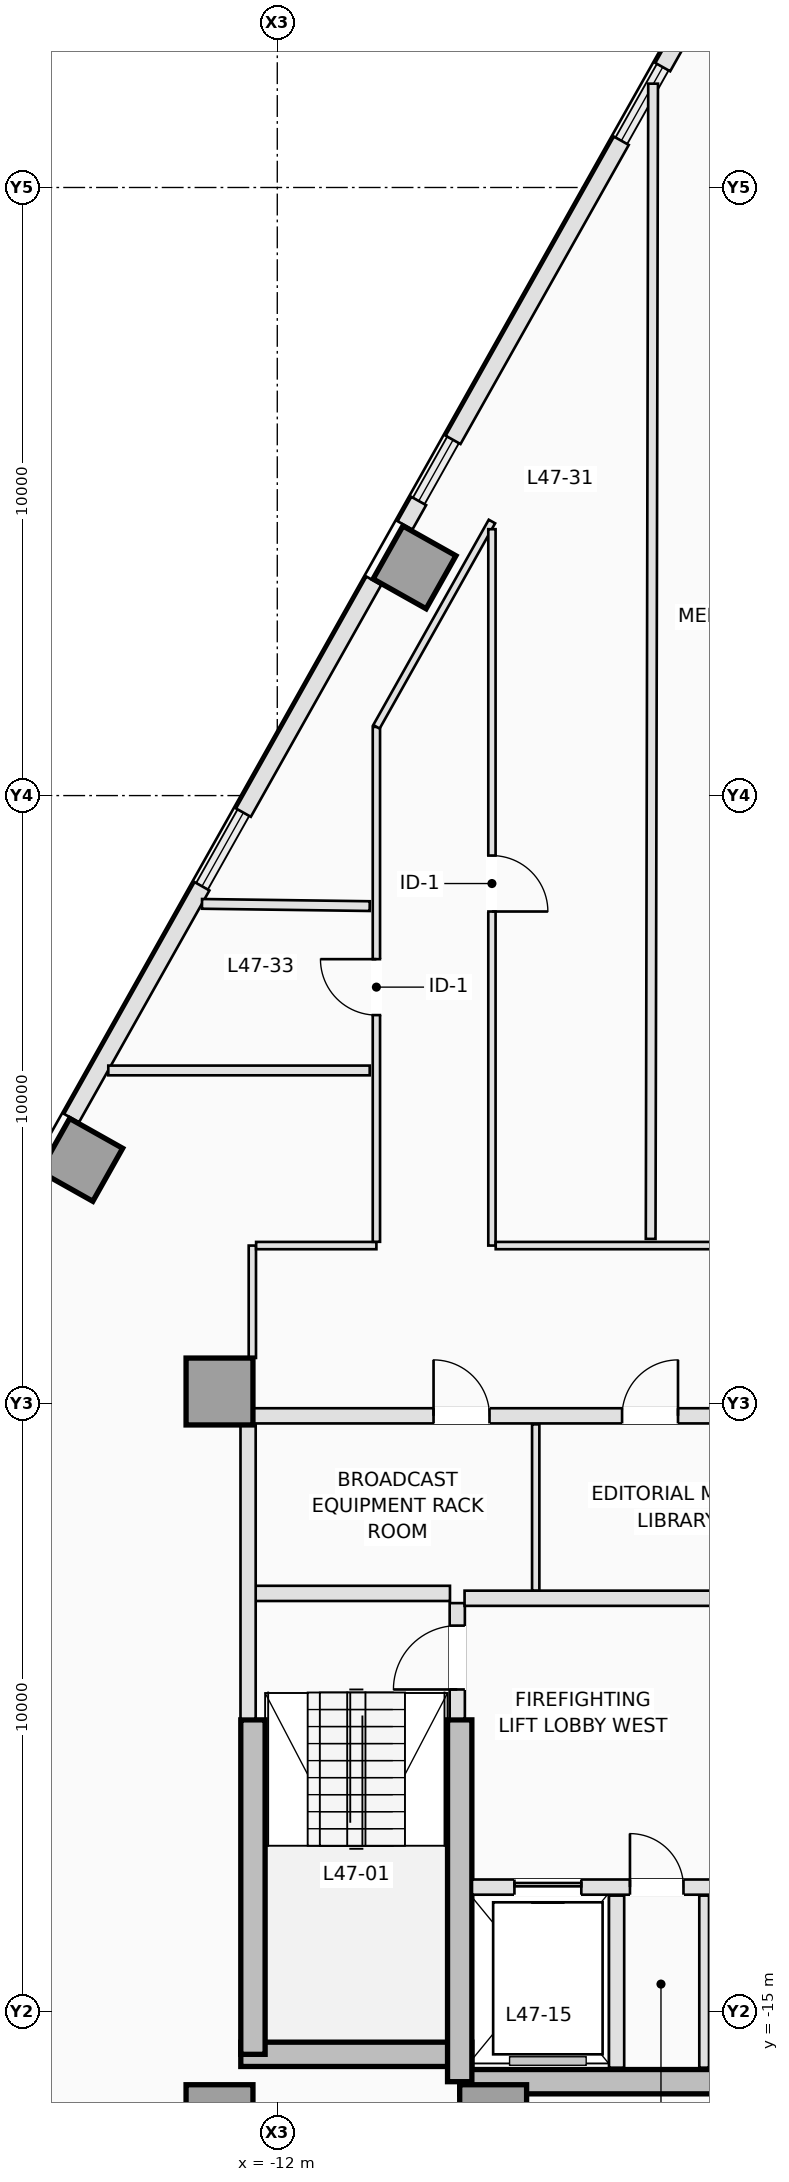
"""IFC4 building model, lengths in metres.
Left out: names, types, materials, properties, quantities, classifications, styles, units other than length and angle.
Written with IfcOpenShell. Run it as: python <this file> out.ifc"""

import sys

from ifc_helpers import new_model, si_unit, direction, frame, frame_2d, origin, origin_2d, place, context, subcontext, project, spatial, rectangle, extrude, element, fill, save


model = new_model("IFC4")
c1 = context("Model", 3, precision=1e-05, world=origin(), true_north=direction((0.0, 1.0)))
c2 = subcontext(c1, "Body", "Model", "MODEL_VIEW")
j1 = project(units=[si_unit("LENGTHUNIT", "METRE"), si_unit("PLANEANGLEUNIT", "RADIAN")], contexts=[c1])
p1 = place(None, origin())
s1 = spatial("IfcSite", under=j1, at=p1, CompositionType="ELEMENT")
p2 = place(p1, origin())
s2 = spatial("IfcBuilding", under=s1, at=p2, CompositionType="ELEMENT")
p3 = place(p2, frame((0.0, 0.0, 172.0)))
s3 = spatial("IfcBuildingStorey", under=s2, at=p3, CompositionType="ELEMENT", Elevation=172.0)
p4 = place(p3, frame((-12.6, -15.7, 0.0), z_axis=(0.0, 0.0, 1.0), x_axis=(1.0, 0.0, 0.0)))
e1 = element("IfcWall", 1, at=p4, inside=s3, PredefinedType="SHEAR", context=c2, shape_type="SweptSolid", body=[
    extrude(rectangle(XDim=3.8, YDim=0.4, at=frame_2d((1.9, 0.0))), origin(), (0.0, 0.0, 1.0), 3.5),
])
p5 = place(p3, frame((-9.0, -16.15, 0.0), z_axis=(0.0, 0.0, 1.0), x_axis=(1.0, 0.0, 0.0)))
e2 = element("IfcWall", 2, at=p5, inside=s3, PredefinedType="SHEAR", context=c2, shape_type="SweptSolid", body=[
    extrude(rectangle(XDim=5.25, YDim=0.4, at=frame_2d((2.625, 0.0))), origin(), (0.0, 0.0, 1.0), 3.5),
])
p6 = place(p3, frame((-12.4, -15.7, 0.0), z_axis=(0.0, 0.0, 1.0), x_axis=(0.0, 1.0, 0.0)))
e3 = element("IfcWall", 3, at=p6, inside=s3, PredefinedType="SHEAR", context=c2, shape_type="SweptSolid", body=[
    extrude(rectangle(XDim=5.5, YDim=0.4, at=frame_2d((2.75, 0.0))), origin(), (0.0, 0.0, 1.0), 3.5),
])
p7 = place(p3, frame((-9.0, -16.15, 0.0), z_axis=(0.0, 0.0, 1.0), x_axis=(0.0, 1.0, 0.0)))
e4 = element("IfcWall", 4, at=p7, inside=s3, PredefinedType="SHEAR", context=c2, shape_type="SweptSolid", body=[
    extrude(rectangle(XDim=5.95, YDim=0.4, at=frame_2d((2.975, 0.0))), origin(), (0.0, 0.0, 1.0), 3.5),
])
for number, where, z_axis, x_axis in (
    (5, (-12.95, -16.75, 0.0), (0.0, 0.0, 1.0), (1.0, 0.0, 0.0)),
    (6, (-8.45, -16.75, 0.0), (0.0, 0.0, 1.0), (1.0, 0.0, 0.0)),
    (7, (-12.95, -4.8, 0.0), (0.0, 0.0, 1.0), (1.0, 0.0, 0.0)),
):
    element("IfcColumn", number, at=place(p3, frame(where, z_axis=z_axis, x_axis=x_axis)), inside=s3, PredefinedType="COLUMN", context=c2, shape_type="SweptSolid", body=[
        extrude(rectangle(XDim=1.1, YDim=1.1, at=origin_2d()), origin(), (0.0, 0.0, 1.0), 3.5),
    ])
for number, where, z_axis, x_axis in (
    (8, (-9.743, 8.753, 0.0), (0.0, 0.0, 1.0), (-0.872, 0.49, 0.0)),
    (9, (-15.224, -0.991, 0.0), (0.0, 0.0, 1.0), (-0.872, 0.49, 0.0)),
):
    element("IfcColumn", number, at=place(p3, frame(where, z_axis=z_axis, x_axis=x_axis)), inside=s3, PredefinedType="COLUMN", context=c2, shape_type="SweptSolid", body=[
        extrude(rectangle(XDim=1.0, YDim=1.0, at=origin_2d()), origin(), (0.0, 0.0, 1.0), 3.5),
    ])
p8 = place(p3, frame((-9.9, 9.444, 0.0), z_axis=(0.0, 0.0, 1.0), x_axis=(0.490412424957, 0.871490478116, 0.0)))
e10 = element("IfcWall", 10, at=p8, inside=s3, PredefinedType="STANDARD", context=c2, shape_type="SweptSolid", body=[
    extrude(rectangle(XDim=0.46, YDim=0.28, at=frame_2d((0.23, 0.0))), origin(), (0.0, 0.0, 1.0), 3.25),
])
p9 = place(p3, frame((-9.109, 10.85, 0.0), z_axis=(0.0, 0.0, 1.0), x_axis=(0.490289995219, 0.871559361483, 0.0)))
e11 = element("IfcWall", 11, at=p9, inside=s3, PredefinedType="STANDARD", context=c2, shape_type="SweptSolid", body=[
    extrude(rectangle(XDim=5.643, YDim=0.28, at=frame_2d((2.822, 0.0))), origin(), (0.0, 0.0, 1.0), 3.25),
])
p10 = place(p3, frame((-5.661, 16.98, 0.0), z_axis=(0.0, 0.0, 1.0), x_axis=(0.490248749158, 0.871582562899, 0.0)))
e12 = element("IfcWall", 12, at=p10, inside=s3, PredefinedType="STANDARD", context=c2, shape_type="SweptSolid", body=[
    extrude(rectangle(XDim=1.856, YDim=0.28, at=frame_2d((0.928, 0.0))), origin(), (0.0, 0.0, 1.0), 3.25),
])
p11 = place(p3, frame((-15.383, -0.305, 0.0), z_axis=(0.0, 0.0, 1.0), x_axis=(0.490232095789, 0.871591929895, 0.0)))
e13 = element("IfcWall", 13, at=p11, inside=s3, PredefinedType="STANDARD", context=c2, shape_type="SweptSolid", body=[
    extrude(rectangle(XDim=4.375, YDim=0.28, at=frame_2d((2.188, 0.0))), origin(), (0.0, 0.0, 1.0), 3.25),
])
p12 = place(p3, frame((-12.557, 4.72, 0.0), z_axis=(0.0, 0.0, 1.0), x_axis=(0.490274486291, 0.871568085747, 0.0)))
e14 = element("IfcWall", 14, at=p12, inside=s3, PredefinedType="STANDARD", context=c2, shape_type="SweptSolid", body=[
    extrude(rectangle(XDim=4.375, YDim=0.28, at=frame_2d((2.188, 0.0))), origin(), (0.0, 0.0, 1.0), 3.25),
])
p13 = place(p3, frame((-9.04, -10.18, 0.0), z_axis=(0.0, 0.0, 1.0), x_axis=(0.0, 1.0, 0.0)))
e15 = element("IfcWall", 15, at=p13, inside=s3, PredefinedType="PARTITIONING", context=c2, shape_type="SweptSolid", body=[
    extrude(rectangle(XDim=1.9, YDim=0.25, at=frame_2d((0.95, 0.0))), origin(), (0.0, 0.0, 1.0), 3.25),
])
p14 = place(p13, frame((0.48, 0.0, 0.0)))
e16 = element("IfcOpeningElement", 16, at=p14, cuts=e15, PredefinedType="OPENING", context=c2, shape_type="SweptSolid", body=[
    extrude(rectangle(XDim=1.05, YDim=2.15, at=frame_2d((0.525, 1.075))), frame((0.0, 0.135, 0.0), z_axis=(0.0, -1.0, 0.0), x_axis=(1.0, 0.0, 0.0)), (0.0, 0.0, 1.0), 0.27),
])
p15 = place(p3, frame((-12.38, -8.12, 0.0), z_axis=(0.0, 0.0, 1.0), x_axis=(1.0, 0.0, 0.0)))
e17 = element("IfcWall", 17, at=p15, inside=s3, PredefinedType="PARTITIONING", context=c2, shape_type="SweptSolid", body=[
    extrude(rectangle(XDim=3.22, YDim=0.25, at=frame_2d((1.61, 0.0))), origin(), (0.0, 0.0, 1.0), 3.25),
])
p16 = place(p3, frame((-12.48, -10.18, 0.0), z_axis=(0.0, 0.0, 1.0), x_axis=(0.0, 1.0, 0.0)))
e18 = element("IfcWall", 18, at=p16, inside=s3, PredefinedType="PARTITIONING", context=c2, shape_type="SweptSolid", body=[
    extrude(rectangle(XDim=4.828, YDim=0.25, at=frame_2d((2.414, 0.0))), origin(), (0.0, 0.0, 1.0), 3.25),
])
p17 = place(p3, frame((-8.798, -12.95, 0.0), z_axis=(0.0, 0.0, 1.0), x_axis=(1.0, 0.0, 0.0)))
e19 = element("IfcWall", 19, at=p17, inside=s3, PredefinedType="PARTITIONING", context=c2, shape_type="SweptSolid", body=[
    extrude(rectangle(XDim=5.118, YDim=0.25, at=frame_2d((2.559, 0.0))), origin(), (0.0, 0.0, 1.0), 3.25),
])
p18 = place(p17, frame((0.698, 0.0, 0.0)))
e20 = element("IfcOpeningElement", 20, at=p18, cuts=e19, PredefinedType="OPENING", context=c2, shape_type="SweptSolid", body=[
    extrude(rectangle(XDim=1.1, YDim=2.15, at=frame_2d((0.55, 1.075))), frame((0.0, 0.135, 0.0), z_axis=(0.0, -1.0, 0.0), x_axis=(1.0, 0.0, 0.0)), (0.0, 0.0, 1.0), 0.27),
])
p19 = place(p17, frame((2.598, 0.0, 0.0)))
e21 = element("IfcOpeningElement", 21, at=p19, cuts=e19, PredefinedType="OPENING", context=c2, shape_type="SweptSolid", body=[
    extrude(rectangle(XDim=0.88, YDim=2.1, at=frame_2d((0.44, 1.05))), frame((0.0, 0.135, 0.0), z_axis=(0.0, -1.0, 0.0), x_axis=(1.0, 0.0, 0.0)), (0.0, 0.0, 1.0), 0.27),
])
p20 = place(p17, frame((3.998, 0.0, 0.0)))
e22 = element("IfcOpeningElement", 22, at=p20, cuts=e19, PredefinedType="OPENING", context=c2, shape_type="SweptSolid", body=[
    extrude(rectangle(XDim=0.88, YDim=2.1, at=frame_2d((0.44, 1.05))), frame((0.0, 0.135, 0.0), z_axis=(0.0, -1.0, 0.0), x_axis=(1.0, 0.0, 0.0)), (0.0, 0.0, 1.0), 0.27),
])
p21 = place(p3, frame((-6.42, -15.92, 0.0), z_axis=(0.0, 0.0, 1.0), x_axis=(0.0, 1.0, 0.0)))
e23 = element("IfcWall", 23, at=p21, inside=s3, PredefinedType="PARTITIONING", context=c2, shape_type="SweptSolid", body=[
    extrude(rectangle(XDim=2.83, YDim=0.25, at=frame_2d((1.415, 0.0))), origin(), (0.0, 0.0, 1.0), 3.25),
])
p22 = place(p3, frame((-4.98, -15.92, 0.0), z_axis=(0.0, 0.0, 1.0), x_axis=(0.0, 1.0, 0.0)))
e24 = element("IfcWall", 24, at=p22, inside=s3, PredefinedType="PARTITIONING", context=c2, shape_type="SweptSolid", body=[
    extrude(rectangle(XDim=2.83, YDim=0.16, at=frame_2d((1.415, 0.0))), origin(), (0.0, 0.0, 1.0), 3.25),
])
p23 = place(p3, frame((-8.92, -8.2, 0.0), z_axis=(0.0, 0.0, 1.0), x_axis=(1.0, 0.0, 0.0)))
e25 = element("IfcWall", 25, at=p23, inside=s3, PredefinedType="PARTITIONING", context=c2, shape_type="SweptSolid", body=[
    extrude(rectangle(XDim=5.24, YDim=0.25, at=frame_2d((2.62, 0.0))), origin(), (0.0, 0.0, 1.0), 3.25),
])
p24 = place(p3, frame((-12.398, -5.2, 0.0), z_axis=(0.0, 0.0, 1.0), x_axis=(1.0, 0.0, 0.0)))
e26 = element("IfcWall", 26, at=p24, inside=s3, PredefinedType="PARTITIONING", context=c2, shape_type="SweptSolid", body=[
    extrude(rectangle(XDim=8.096, YDim=0.25, at=frame_2d((4.048, 0.0))), origin(), (0.0, 0.0, 1.0), 3.25),
])
p25 = place(p24, frame((2.968, 0.0, 0.0)))
e27 = element("IfcOpeningElement", 27, at=p25, cuts=e26, PredefinedType="OPENING", context=c2, shape_type="SweptSolid", body=[
    extrude(rectangle(XDim=0.92, YDim=2.12, at=frame_2d((0.46, 1.06))), frame((0.0, 0.135, 0.0), z_axis=(0.0, -1.0, 0.0), x_axis=(1.0, 0.0, 0.0)), (0.0, 0.0, 1.0), 0.27),
])
p26 = place(p24, frame((6.068, 0.0, 0.0)))
e28 = element("IfcOpeningElement", 28, at=p26, cuts=e26, PredefinedType="OPENING", context=c2, shape_type="SweptSolid", body=[
    extrude(rectangle(XDim=0.92, YDim=2.12, at=frame_2d((0.46, 1.06))), frame((0.0, 0.135, 0.0), z_axis=(0.0, -1.0, 0.0), x_axis=(1.0, 0.0, 0.0)), (0.0, 0.0, 1.0), 0.27),
])
p27 = place(p3, frame((-7.75, -8.073, 0.0), z_axis=(0.0, 0.0, 1.0), x_axis=(0.0, 1.0, 0.0)))
e29 = element("IfcWall", 29, at=p27, inside=s3, PredefinedType="PARTITIONING", context=c2, shape_type="SweptSolid", body=[
    extrude(rectangle(XDim=2.733, YDim=0.12, at=frame_2d((1.366, 0.0))), origin(), (0.0, 0.0, 1.0), 3.25),
])
p28 = place(p3, frame((-12.41, -4.248, 0.0), z_axis=(0.0, 0.0, 1.0), x_axis=(0.0, 1.0, 0.0)))
e30 = element("IfcWall", 30, at=p28, inside=s3, PredefinedType="PARTITIONING", context=c2, shape_type="SweptSolid", body=[
    extrude(rectangle(XDim=1.848, YDim=0.12, at=frame_2d((0.924, 0.0))), origin(), (0.0, 0.0, 1.0), 3.25),
])
p29 = place(p3, frame((-12.348, -2.4, 0.0), z_axis=(0.0, 0.0, 1.0), x_axis=(1.0, 0.0, 0.0)))
e31 = element("IfcWall", 31, at=p29, inside=s3, PredefinedType="PARTITIONING", context=c2, shape_type="SweptSolid", body=[
    extrude(rectangle(XDim=1.978, YDim=0.12, at=frame_2d((0.989, 0.0))), origin(), (0.0, 0.0, 1.0), 3.25),
])
p30 = place(p3, frame((-10.37, -2.338, 0.0), z_axis=(0.0, 0.0, 1.0), x_axis=(0.0, 1.0, 0.0)))
e32 = element("IfcWall", 32, at=p30, inside=s3, PredefinedType="PARTITIONING", context=c2, shape_type="SweptSolid", body=[
    extrude(rectangle(XDim=8.467, YDim=0.12, at=frame_2d((4.233, 0.0))), origin(), (0.0, 0.0, 1.0), 3.25),
])
p31 = place(p30, frame((3.728, 0.0, 0.0)))
e33 = element("IfcOpeningElement", 33, at=p31, cuts=e32, PredefinedType="OPENING", context=c2, shape_type="SweptSolid", body=[
    extrude(rectangle(XDim=0.92, YDim=2.12, at=frame_2d((0.46, 1.06))), frame((0.0, 0.07, 0.0), z_axis=(0.0, -1.0, 0.0), x_axis=(1.0, 0.0, 0.0)), (0.0, 0.0, 1.0), 0.14),
])
p32 = place(p3, frame((-10.369, 6.131, 0.0), z_axis=(0.0, 0.0, 1.0), x_axis=(0.49024926945, 0.871582270244, 0.0)))
e34 = element("IfcWall", 34, at=p32, inside=s3, PredefinedType="PARTITIONING", context=c2, shape_type="SweptSolid", body=[
    extrude(rectangle(XDim=3.873, YDim=0.12, at=frame_2d((1.937, 0.0))), origin(), (0.0, 0.0, 1.0), 3.25),
])
p33 = place(p3, frame((-8.47, 9.381, 0.0), z_axis=(0.0, 0.0, 1.0), x_axis=(0.0, -1.0, 0.0)))
e35 = element("IfcWall", 35, at=p33, inside=s3, PredefinedType="PARTITIONING", context=c2, shape_type="SweptSolid", body=[
    extrude(rectangle(XDim=11.781, YDim=0.12, at=frame_2d((5.89, 0.0))), origin(), (0.0, 0.0, 1.0), 3.25),
])
p34 = place(p33, frame((5.367, 0.0, 0.0)))
e36 = element("IfcOpeningElement", 36, at=p34, cuts=e35, PredefinedType="OPENING", context=c2, shape_type="SweptSolid", body=[
    extrude(rectangle(XDim=0.92, YDim=2.12, at=frame_2d((0.46, 1.06))), frame((0.0, 0.07, 0.0), z_axis=(0.0, -1.0, 0.0), x_axis=(1.0, 0.0, 0.0)), (0.0, 0.0, 1.0), 0.14),
])
p35 = place(p3, frame((-8.408, -2.4, 0.0), z_axis=(0.0, 0.0, 1.0), x_axis=(1.0, 0.0, 0.0)))
e37 = element("IfcWall", 37, at=p35, inside=s3, PredefinedType="PARTITIONING", context=c2, shape_type="SweptSolid", body=[
    extrude(rectangle(XDim=9.646, YDim=0.12, at=frame_2d((4.823, 0.0))), origin(), (0.0, 0.0, 1.0), 2.891),
])
p36 = place(p35, frame((7.341, 0.0, 0.0)))
e38 = element("IfcOpeningElement", 38, at=p36, cuts=e37, PredefinedType="OPENING", context=c2, shape_type="SweptSolid", body=[
    extrude(rectangle(XDim=0.92, YDim=2.12, at=frame_2d((0.46, 1.06))), frame((0.0, 0.07, 0.0), z_axis=(0.0, -1.0, 0.0), x_axis=(1.0, 0.0, 0.0)), (0.0, 0.0, 1.0), 0.14),
])
p37 = place(p35, frame((3.801, 0.0, 0.0)))
e39 = element("IfcOpeningElement", 39, at=p37, cuts=e37, PredefinedType="OPENING", context=c2, shape_type="SweptSolid", body=[
    extrude(rectangle(XDim=0.92, YDim=2.12, at=frame_2d((0.46, 1.06))), frame((0.0, 0.07, 0.0), z_axis=(0.0, -1.0, 0.0), x_axis=(1.0, 0.0, 0.0)), (0.0, 0.0, 1.0), 0.14),
])
p38 = place(p3, frame((-5.86, -2.29, 0.0), z_axis=(0.0, 0.0, 1.0), x_axis=(0.002107612298, 0.999997778983, 0.0)))
e40 = element("IfcWall", 40, at=p38, inside=s3, PredefinedType="PARTITIONING", context=c2, shape_type="SweptSolid", body=[
    extrude(rectangle(XDim=18.997, YDim=0.16, at=frame_2d((9.499, 0.0))), origin(), (0.0, 0.0, 1.0), 3.25),
])
p39 = place(p3, frame((-10.48, 3.182, 0.0), z_axis=(0.0, 0.0, 1.0), x_axis=(-0.999909495127, 0.013453681797, 0.0)))
e41 = element("IfcWall", 41, at=p39, inside=s3, PredefinedType="PARTITIONING", context=c2, shape_type="SweptSolid", body=[
    extrude(rectangle(XDim=2.758, YDim=0.16, at=frame_2d((1.379, 0.0))), origin(), (0.0, 0.0, 1.0), 3.25),
])
p40 = place(p3, frame((-10.48, 0.48, 0.0), z_axis=(0.0, 0.0, 1.0), x_axis=(-1.0, 0.0, 0.0)))
e42 = element("IfcWall", 42, at=p40, inside=s3, PredefinedType="PARTITIONING", context=c2, shape_type="SweptSolid", body=[
    extrude(rectangle(XDim=4.299, YDim=0.16, at=frame_2d((2.149, 0.0))), origin(), (0.0, 0.0, 1.0), 3.25),
])
p41 = place(p18, origin())
e43 = element("IfcDoor", 43, at=p41, inside=s3, OperationType="SLIDING_TO_LEFT", PredefinedType="DOOR", context=c2, shape_type="SweptSolid", body=[
    extrude(rectangle(XDim=1.1, YDim=2.15, at=frame_2d((0.55, 1.075))), frame((0.0, 0.025, 0.0), z_axis=(0.0, -1.0, 0.0), x_axis=(1.0, 0.0, 0.0)), (0.0, 0.0, 1.0), 0.05),
])
fill(e20, e43)
p42 = place(p14, origin())
e44 = element("IfcDoor", 44, at=p42, inside=s3, OperationType="SINGLE_SWING_LEFT", PredefinedType="DOOR", context=c2, shape_type="SweptSolid", body=[
    extrude(rectangle(XDim=1.05, YDim=2.15, at=frame_2d((0.525, 1.075))), frame((0.0, 0.025, 0.0), z_axis=(0.0, -1.0, 0.0), x_axis=(1.0, 0.0, 0.0)), (0.0, 0.0, 1.0), 0.05),
])
fill(e16, e44)
p43 = place(p19, origin())
e45 = element("IfcDoor", 45, at=p43, inside=s3, OperationType="SINGLE_SWING_LEFT", PredefinedType="TRAPDOOR", context=c2, shape_type="SweptSolid", body=[
    extrude(rectangle(XDim=0.88, YDim=2.1, at=frame_2d((0.44, 1.05))), frame((0.0, 0.025, 0.0), z_axis=(0.0, -1.0, 0.0), x_axis=(1.0, 0.0, 0.0)), (0.0, 0.0, 1.0), 0.05),
])
fill(e21, e45)
p44 = place(p25, origin())
e46 = element("IfcDoor", 46, at=p44, inside=s3, OperationType="SINGLE_SWING_LEFT", PredefinedType="DOOR", context=c2, shape_type="SweptSolid", body=[
    extrude(rectangle(XDim=0.92, YDim=2.12, at=frame_2d((0.46, 1.06))), frame((0.0, 0.025, 0.0), z_axis=(0.0, -1.0, 0.0), x_axis=(1.0, 0.0, 0.0)), (0.0, 0.0, 1.0), 0.05),
])
fill(e27, e46)
p45 = place(p26, origin())
e47 = element("IfcDoor", 47, at=p45, inside=s3, OperationType="SINGLE_SWING_RIGHT", PredefinedType="DOOR", context=c2, shape_type="SweptSolid", body=[
    extrude(rectangle(XDim=0.92, YDim=2.12, at=frame_2d((0.46, 1.06))), frame((0.0, 0.025, 0.0), z_axis=(0.0, -1.0, 0.0), x_axis=(1.0, 0.0, 0.0)), (0.0, 0.0, 1.0), 0.05),
])
fill(e28, e47)
p46 = place(p34, origin())
e48 = element("IfcDoor", 48, at=p46, inside=s3, OperationType="SINGLE_SWING_RIGHT", PredefinedType="DOOR", context=c2, shape_type="SweptSolid", body=[
    extrude(rectangle(XDim=0.92, YDim=2.12, at=frame_2d((0.46, 1.06))), frame((0.0, 0.025, 0.0), z_axis=(0.0, -1.0, 0.0), x_axis=(1.0, 0.0, 0.0)), (0.0, 0.0, 1.0), 0.05),
])
fill(e36, e48)
p47 = place(p31, origin())
e49 = element("IfcDoor", 49, at=p47, inside=s3, OperationType="SINGLE_SWING_RIGHT", PredefinedType="DOOR", context=c2, shape_type="SweptSolid", body=[
    extrude(rectangle(XDim=0.92, YDim=2.12, at=frame_2d((0.46, 1.06))), frame((0.0, 0.025, 0.0), z_axis=(0.0, -1.0, 0.0), x_axis=(1.0, 0.0, 0.0)), (0.0, 0.0, 1.0), 0.05),
])
fill(e33, e49)
save(model, sys.argv[1])
